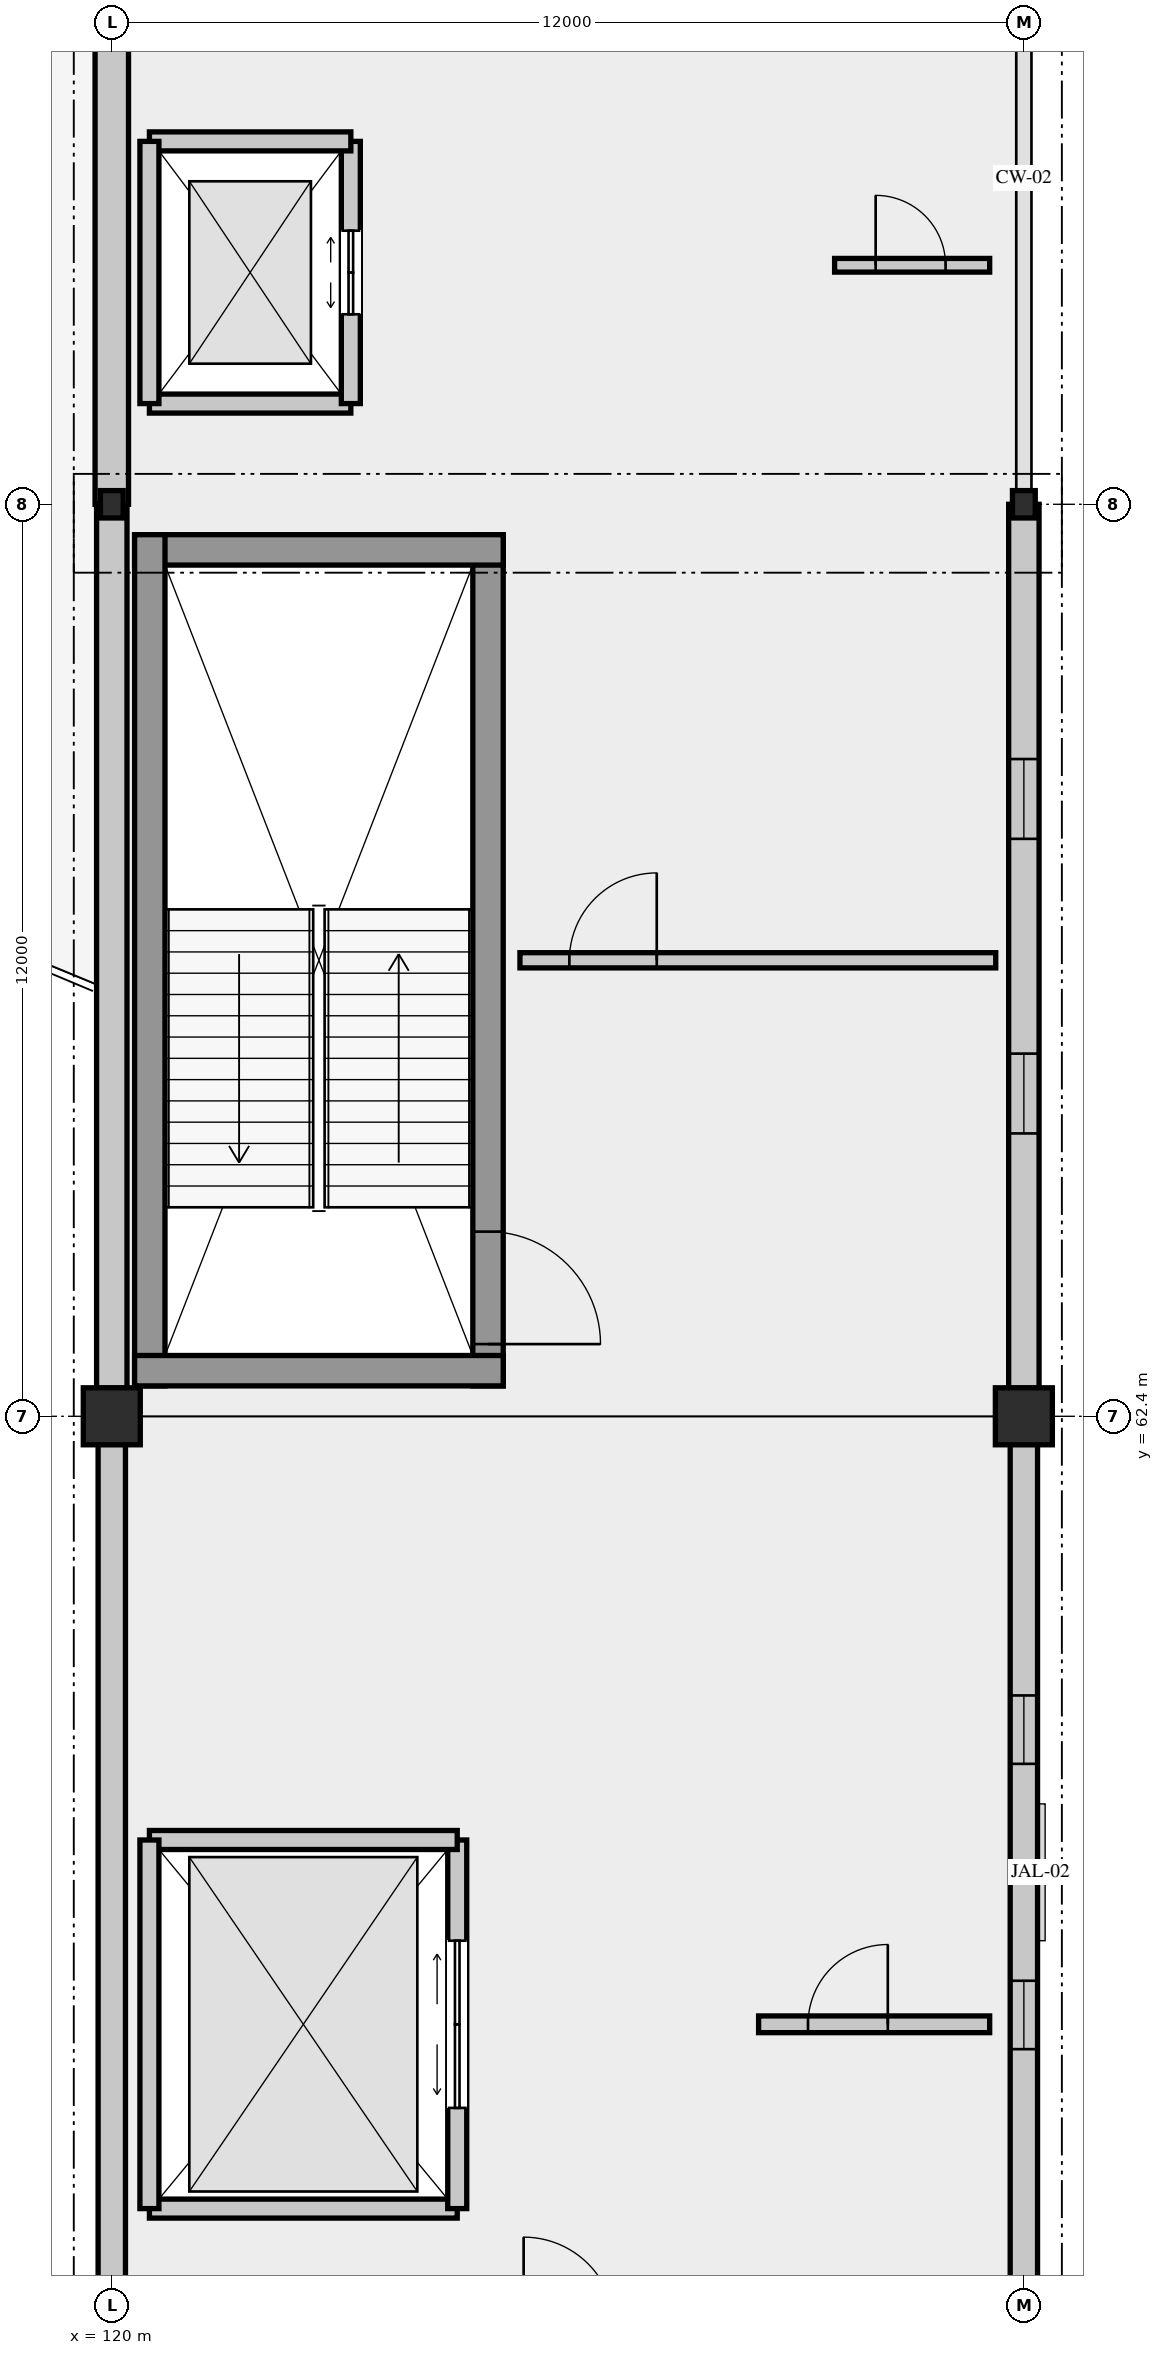
"""IFC4 building model, lengths in metres.
Left out: names, types, materials, properties, quantities, classifications, styles, units other than length and angle.
Written with IfcOpenShell. Run it as: python <this file> out.ifc"""

import sys

from ifc_helpers import new_model, si_unit, direction, frame, frame_2d, origin, origin_2d, place, context, subcontext, project, spatial, rectangle, i_section, extrude, element, fill, save


model = new_model("IFC4")
c1 = context("Model", 3, precision=1e-05, world=origin(), true_north=direction((0.0, 1.0)))
c2 = subcontext(c1, "Body", "Model", "MODEL_VIEW")
j1 = project(units=[si_unit("LENGTHUNIT", "METRE"), si_unit("PLANEANGLEUNIT", "RADIAN")], contexts=[c1])
p1 = place(None, origin())
s1 = spatial("IfcSite", under=j1, at=p1, CompositionType="ELEMENT")
p2 = place(p1, origin())
s2 = spatial("IfcBuilding", under=s1, at=p2, CompositionType="ELEMENT")
p3 = place(p2, origin())
s3 = spatial("IfcBuildingStorey", under=s2, at=p3, CompositionType="ELEMENT", Elevation=0.0)
p4 = place(p3, frame((120.0, 62.4, 0.0), z_axis=(0.0, 0.0, 1.0), x_axis=(1.0, 0.0, 0.0)))
e1 = element("IfcColumn", 1, at=p4, inside=s3, PredefinedType="COLUMN", context=c2, shape_type="SweptSolid", body=[
    extrude(rectangle(XDim=0.75, YDim=0.75, at=origin_2d()), origin(), (0.0, 0.0, 1.0), 5.4),
])
p5 = place(p3, frame((120.0, 74.4, 0.0), z_axis=(0.0, 0.0, 1.0), x_axis=(1.0, 0.0, 0.0)))
e2 = element("IfcColumn", 2, at=p5, inside=s3, PredefinedType="COLUMN", context=c2, shape_type="SweptSolid", body=[
    extrude(i_section(OverallWidth=0.3, OverallDepth=0.36, WebThickness=0.012, FlangeThickness=0.022, FilletRadius=0.027, at=origin_2d()), origin(), (0.0, 0.0, 1.0), 5.4),
])
p6 = place(p3, frame((132.0, 62.4, 0.0), z_axis=(0.0, 0.0, 1.0), x_axis=(1.0, 0.0, 0.0)))
e3 = element("IfcColumn", 3, at=p6, inside=s3, PredefinedType="COLUMN", context=c2, shape_type="SweptSolid", body=[
    extrude(rectangle(XDim=0.75, YDim=0.75, at=origin_2d()), origin(), (0.0, 0.0, 1.0), 5.4),
])
p7 = place(p3, frame((132.0, 74.4, 0.0), z_axis=(0.0, 0.0, 1.0), x_axis=(1.0, 0.0, 0.0)))
e4 = element("IfcColumn", 4, at=p7, inside=s3, PredefinedType="COLUMN", context=c2, shape_type="SweptSolid", body=[
    extrude(i_section(OverallWidth=0.3, OverallDepth=0.36, WebThickness=0.012, FlangeThickness=0.022, FilletRadius=0.027, at=origin_2d()), origin(), (0.0, 0.0, 1.0), 5.4),
])
p8 = place(p3, frame((120.0, 62.03, 0.0), z_axis=(0.0, 0.0, 1.0), x_axis=(0.0, -1.0, 0.0)))
e5 = element("IfcWall", 5, at=p8, inside=s3, PredefinedType="SOLIDWALL", context=c2, shape_type="SweptSolid", body=[
    extrude(rectangle(XDim=11.26, YDim=0.36, at=frame_2d((5.63, 0.0))), origin(), (0.0, 0.0, 1.0), 4.56),
])
p9 = place(p3, frame((132.0, 50.77, 0.0), z_axis=(0.0, 0.0, 1.0), x_axis=(0.0, 1.0, 0.0)))
e6 = element("IfcWall", 6, at=p9, inside=s3, PredefinedType="SOLIDWALL", context=c2, shape_type="SweptSolid", body=[
    extrude(rectangle(XDim=11.26, YDim=0.36, at=frame_2d((5.63, 0.0))), origin(), (0.0, 0.0, 1.0), 4.56),
])
p10 = place(p9, frame((3.303, 0.0, 0.95)))
e7 = element("IfcOpeningElement", 7, at=p10, cuts=e6, PredefinedType="OPENING", context=c2, shape_type="SweptSolid", body=[
    extrude(rectangle(XDim=0.9, YDim=1.8, at=frame_2d((0.45, 0.9))), frame((0.0, 0.19, 0.0), z_axis=(0.0, -1.0, 0.0), x_axis=(1.0, 0.0, 0.0)), (0.0, 0.0, 1.0), 0.38),
])
p11 = place(p9, frame((7.057, 0.0, 0.95)))
e8 = element("IfcOpeningElement", 8, at=p11, cuts=e6, PredefinedType="OPENING", context=c2, shape_type="SweptSolid", body=[
    extrude(rectangle(XDim=0.9, YDim=1.8, at=frame_2d((0.45, 0.9))), frame((0.0, 0.19, 0.0), z_axis=(0.0, -1.0, 0.0), x_axis=(1.0, 0.0, 0.0)), (0.0, 0.0, 1.0), 0.38),
])
p12 = place(p3, frame((120.0, 74.4, 0.0), z_axis=(0.0, 0.0, 1.0), x_axis=(0.0, -1.0, 0.0)))
e9 = element("IfcWall", 9, at=p12, inside=s3, PredefinedType="SOLIDWALL", context=c2, shape_type="SweptSolid", body=[
    extrude(rectangle(XDim=11.63, YDim=0.4, at=frame_2d((5.815, 0.0))), origin(), (0.0, 0.0, 1.0), 4.56),
])
p13 = place(p3, frame((132.0, 62.77, 0.0), z_axis=(0.0, 0.0, 1.0), x_axis=(0.0, 1.0, 0.0)))
e10 = element("IfcWall", 10, at=p13, inside=s3, PredefinedType="SOLIDWALL", context=c2, shape_type="SweptSolid", body=[
    extrude(rectangle(XDim=11.63, YDim=0.4, at=frame_2d((5.815, 0.0))), origin(), (0.0, 0.0, 1.0), 4.56),
])
p14 = place(p13, frame((3.352, 0.0, 0.95)))
e11 = element("IfcOpeningElement", 11, at=p14, cuts=e10, PredefinedType="OPENING", context=c2, shape_type="SweptSolid", body=[
    extrude(rectangle(XDim=1.05, YDim=1.8, at=frame_2d((0.525, 0.9))), frame((0.0, 0.21, 0.0), z_axis=(0.0, -1.0, 0.0), x_axis=(1.0, 0.0, 0.0)), (0.0, 0.0, 1.0), 0.42),
])
p15 = place(p13, frame((7.228, 0.0, 0.95)))
e12 = element("IfcOpeningElement", 12, at=p15, cuts=e10, PredefinedType="OPENING", context=c2, shape_type="SweptSolid", body=[
    extrude(rectangle(XDim=1.05, YDim=1.8, at=frame_2d((0.525, 0.9))), frame((0.0, 0.21, 0.0), z_axis=(0.0, -1.0, 0.0), x_axis=(1.0, 0.0, 0.0)), (0.0, 0.0, 1.0), 0.42),
])
p16 = place(p3, frame((120.0, 84.0, 0.0), z_axis=(0.0, 0.0, 1.0), x_axis=(0.0, -1.0, 0.0)))
e13 = element("IfcWall", 13, at=p16, inside=s3, PredefinedType="SOLIDWALL", context=c2, shape_type="SweptSolid", body=[
    extrude(rectangle(XDim=9.6, YDim=0.44, at=frame_2d((4.8, 0.0))), origin(), (0.0, 0.0, 1.0), 4.52),
])
p17 = place(p3, frame((124.95, 62.8, 0.0), z_axis=(0.0, 0.0, 1.0), x_axis=(0.0, 1.0, 0.0)))
e14 = element("IfcWall", 14, at=p17, inside=s3, PredefinedType="SHEAR", context=c2, shape_type="SweptSolid", body=[
    extrude(rectangle(XDim=11.2, YDim=0.4, at=frame_2d((5.6, 0.0))), origin(), (0.0, 0.0, 1.0), 5.14),
])
p18 = place(p17, frame((0.55, 0.0, 0.0)))
e15 = element("IfcOpeningElement", 15, at=p18, cuts=e14, PredefinedType="OPENING", context=c2, shape_type="SweptSolid", body=[
    extrude(rectangle(XDim=1.48, YDim=2.3, at=frame_2d((0.74, 1.15))), frame((0.0, 0.21, 0.0), z_axis=(0.0, -1.0, 0.0), x_axis=(1.0, 0.0, 0.0)), (0.0, 0.0, 1.0), 0.42),
])
p19 = place(p3, frame((125.15, 73.8, 0.0), z_axis=(0.0, 0.0, 1.0), x_axis=(-1.0, 0.0, 0.0)))
e16 = element("IfcWall", 16, at=p19, inside=s3, PredefinedType="SHEAR", context=c2, shape_type="SweptSolid", body=[
    extrude(rectangle(XDim=4.85, YDim=0.4, at=frame_2d((2.425, 0.0))), origin(), (0.0, 0.0, 1.0), 5.14),
])
p20 = place(p3, frame((120.5, 74.0, 0.0), z_axis=(0.0, 0.0, 1.0), x_axis=(0.0, -1.0, 0.0)))
e17 = element("IfcWall", 17, at=p20, inside=s3, PredefinedType="SHEAR", context=c2, shape_type="SweptSolid", body=[
    extrude(rectangle(XDim=11.2, YDim=0.4, at=frame_2d((5.6, 0.0))), origin(), (0.0, 0.0, 1.0), 5.14),
])
p21 = place(p3, frame((120.3, 63.0, 0.0), z_axis=(0.0, 0.0, 1.0), x_axis=(1.0, 0.0, 0.0)))
e18 = element("IfcWall", 18, at=p21, inside=s3, PredefinedType="SHEAR", context=c2, shape_type="SweptSolid", body=[
    extrude(rectangle(XDim=4.85, YDim=0.4, at=frame_2d((2.425, 0.0))), origin(), (0.0, 0.0, 1.0), 5.14),
])
p22 = place(p3, frame((120.495, 75.725, 0.0), z_axis=(0.0, 0.0, 1.0), x_axis=(1.0, 0.0, 0.0)))
e19 = element("IfcWall", 19, at=p22, inside=s3, PredefinedType="SOLIDWALL", context=c2, shape_type="SweptSolid", body=[
    extrude(rectangle(XDim=2.65, YDim=0.25, at=frame_2d((1.325, 0.0))), origin(), (0.0, 0.0, 1.0), 5.14),
])
p23 = place(p3, frame((123.145, 75.725, 0.0), z_axis=(0.0, 0.0, 1.0), x_axis=(0.0, 1.0, 0.0)))
e20 = element("IfcWall", 20, at=p23, inside=s3, PredefinedType="SOLIDWALL", context=c2, shape_type="SweptSolid", body=[
    extrude(rectangle(XDim=3.45, YDim=0.25, at=frame_2d((1.725, 0.0))), origin(), (0.0, 0.0, 1.0), 5.14),
])
p24 = place(p23, frame((1.175, 0.0, 0.0)))
e21 = element("IfcOpeningElement", 21, at=p24, cuts=e20, PredefinedType="OPENING", context=c2, shape_type="SweptSolid", body=[
    extrude(rectangle(XDim=1.1, YDim=2.2, at=frame_2d((0.55, 1.1))), frame((0.0, 0.135, 0.0), z_axis=(0.0, -1.0, 0.0), x_axis=(1.0, 0.0, 0.0)), (0.0, 0.0, 1.0), 0.27),
])
p25 = place(p3, frame((123.145, 79.175, 0.0), z_axis=(0.0, 0.0, 1.0), x_axis=(-1.0, 0.0, 0.0)))
e22 = element("IfcWall", 22, at=p25, inside=s3, PredefinedType="SOLIDWALL", context=c2, shape_type="SweptSolid", body=[
    extrude(rectangle(XDim=2.65, YDim=0.25, at=frame_2d((1.325, 0.0))), origin(), (0.0, 0.0, 1.0), 5.14),
])
p26 = place(p3, frame((120.495, 79.175, 0.0), z_axis=(0.0, 0.0, 1.0), x_axis=(0.0, -1.0, 0.0)))
e23 = element("IfcWall", 23, at=p26, inside=s3, PredefinedType="SOLIDWALL", context=c2, shape_type="SweptSolid", body=[
    extrude(rectangle(XDim=3.45, YDim=0.25, at=frame_2d((1.725, 0.0))), origin(), (0.0, 0.0, 1.0), 5.14),
])
p27 = place(p3, frame((120.495, 51.975, 0.0), z_axis=(0.0, 0.0, 1.0), x_axis=(1.0, 0.0, 0.0)))
e24 = element("IfcWall", 24, at=p27, inside=s3, PredefinedType="SOLIDWALL", context=c2, shape_type="SweptSolid", body=[
    extrude(rectangle(XDim=4.05, YDim=0.25, at=frame_2d((2.025, 0.0))), origin(), (0.0, 0.0, 1.0), 5.14),
])
p28 = place(p3, frame((124.545, 51.975, 0.0), z_axis=(0.0, 0.0, 1.0), x_axis=(0.0, 1.0, 0.0)))
e25 = element("IfcWall", 25, at=p28, inside=s3, PredefinedType="SOLIDWALL", context=c2, shape_type="SweptSolid", body=[
    extrude(rectangle(XDim=4.85, YDim=0.25, at=frame_2d((2.425, 0.0))), origin(), (0.0, 0.0, 1.0), 5.14),
])
p29 = place(p28, frame((1.325, 0.0, 0.0)))
e26 = element("IfcOpeningElement", 26, at=p29, cuts=e25, PredefinedType="OPENING", context=c2, shape_type="SweptSolid", body=[
    extrude(rectangle(XDim=2.2, YDim=2.65, at=frame_2d((1.1, 1.325))), frame((0.0, 0.135, 0.0), z_axis=(0.0, -1.0, 0.0), x_axis=(1.0, 0.0, 0.0)), (0.0, 0.0, 1.0), 0.27),
])
p30 = place(p3, frame((124.545, 56.825, 0.0), z_axis=(0.0, 0.0, 1.0), x_axis=(-1.0, 0.0, 0.0)))
e27 = element("IfcWall", 27, at=p30, inside=s3, PredefinedType="SOLIDWALL", context=c2, shape_type="SweptSolid", body=[
    extrude(rectangle(XDim=4.05, YDim=0.25, at=frame_2d((2.025, 0.0))), origin(), (0.0, 0.0, 1.0), 5.14),
])
p31 = place(p3, frame((120.495, 56.825, 0.0), z_axis=(0.0, 0.0, 1.0), x_axis=(0.0, -1.0, 0.0)))
e28 = element("IfcWall", 28, at=p31, inside=s3, PredefinedType="SOLIDWALL", context=c2, shape_type="SweptSolid", body=[
    extrude(rectangle(XDim=4.85, YDim=0.25, at=frame_2d((2.425, 0.0))), origin(), (0.0, 0.0, 1.0), 5.14),
])
p32 = place(p3, frame((128.51, 54.4, 0.0), z_axis=(0.0, 0.0, 1.0), x_axis=(1.0, 0.0, 0.0)))
e29 = element("IfcWall", 29, at=p32, inside=s3, PredefinedType="PARTITIONING", context=c2, shape_type="SweptSolid", body=[
    extrude(rectangle(XDim=3.04, YDim=0.22, at=frame_2d((1.52, 0.0))), origin(), (0.0, 0.0, 1.0), 4.67),
])
p33 = place(p32, frame((0.65, 0.0, 0.0)))
e30 = element("IfcOpeningElement", 30, at=p33, cuts=e29, PredefinedType="OPENING", context=c2, shape_type="SweptSolid", body=[
    extrude(rectangle(XDim=1.05, YDim=2.2, at=frame_2d((0.525, 1.1))), frame((0.0, 0.12, 0.0), z_axis=(0.0, -1.0, 0.0), x_axis=(1.0, 0.0, 0.0)), (0.0, 0.0, 1.0), 0.24),
])
p34 = place(p3, frame((125.37, 68.4, 0.0), z_axis=(0.0, 0.0, 1.0), x_axis=(1.0, 0.0, 0.0)))
e31 = element("IfcWall", 31, at=p34, inside=s3, PredefinedType="PARTITIONING", context=c2, shape_type="SweptSolid", body=[
    extrude(rectangle(XDim=6.26, YDim=0.2, at=frame_2d((3.13, 0.0))), origin(), (0.0, 0.0, 1.0), 4.67),
])
p35 = place(p34, frame((0.65, 0.0, 0.0)))
e32 = element("IfcOpeningElement", 32, at=p35, cuts=e31, PredefinedType="OPENING", context=c2, shape_type="SweptSolid", body=[
    extrude(rectangle(XDim=1.15, YDim=2.25, at=frame_2d((0.575, 1.125))), frame((0.0, 0.11, 0.0), z_axis=(0.0, -1.0, 0.0), x_axis=(1.0, 0.0, 0.0)), (0.0, 0.0, 1.0), 0.22),
])
p36 = place(p3, frame((129.51, 77.545, 0.0), z_axis=(0.0, 0.0, 1.0), x_axis=(1.0, 0.0, 0.0)))
e33 = element("IfcWall", 33, at=p36, inside=s3, PredefinedType="PARTITIONING", context=c2, shape_type="SweptSolid", body=[
    extrude(rectangle(XDim=2.04, YDim=0.18, at=frame_2d((1.02, 0.0))), origin(), (0.0, 0.0, 1.0), 4.76),
])
p37 = place(p36, frame((0.54, 0.0, 0.0)))
e34 = element("IfcOpeningElement", 34, at=p37, cuts=e33, PredefinedType="OPENING", context=c2, shape_type="SweptSolid", body=[
    extrude(rectangle(XDim=0.92, YDim=2.15, at=frame_2d((0.46, 1.075))), frame((0.0, 0.1, 0.0), z_axis=(0.0, -1.0, 0.0), x_axis=(1.0, 0.0, 0.0)), (0.0, 0.0, 1.0), 0.2),
])
p38 = place(p10, origin())
e35 = element("IfcWindow", 35, at=p38, inside=s3, PartitioningType="SINGLE_PANEL", PredefinedType="WINDOW", context=c2, shape_type="SweptSolid", body=[
    extrude(rectangle(XDim=0.9, YDim=1.8, at=frame_2d((0.45, 0.9))), frame((0.0, 0.03, 0.0), z_axis=(0.0, -1.0, 0.0), x_axis=(1.0, 0.0, 0.0)), (0.0, 0.0, 1.0), 0.06),
])
fill(e7, e35)
p39 = place(p11, origin())
e36 = element("IfcWindow", 36, at=p39, inside=s3, PartitioningType="SINGLE_PANEL", PredefinedType="WINDOW", context=c2, shape_type="SweptSolid", body=[
    extrude(rectangle(XDim=0.9, YDim=1.8, at=frame_2d((0.45, 0.9))), frame((0.0, 0.03, 0.0), z_axis=(0.0, -1.0, 0.0), x_axis=(1.0, 0.0, 0.0)), (0.0, 0.0, 1.0), 0.06),
])
fill(e8, e36)
p40 = place(p14, origin())
e37 = element("IfcWindow", 37, at=p40, inside=s3, PartitioningType="SINGLE_PANEL", PredefinedType="WINDOW", context=c2, shape_type="SweptSolid", body=[
    extrude(rectangle(XDim=1.05, YDim=1.8, at=frame_2d((0.525, 0.9))), frame((0.0, 0.03, 0.0), z_axis=(0.0, -1.0, 0.0), x_axis=(1.0, 0.0, 0.0)), (0.0, 0.0, 1.0), 0.06),
])
fill(e11, e37)
p41 = place(p15, origin())
e38 = element("IfcWindow", 38, at=p41, inside=s3, PartitioningType="SINGLE_PANEL", PredefinedType="WINDOW", context=c2, shape_type="SweptSolid", body=[
    extrude(rectangle(XDim=1.05, YDim=1.8, at=frame_2d((0.525, 0.9))), frame((0.0, 0.03, 0.0), z_axis=(0.0, -1.0, 0.0), x_axis=(1.0, 0.0, 0.0)), (0.0, 0.0, 1.0), 0.06),
])
fill(e12, e38)
p42 = place(p18, frame((1.48, 0.0, 0.0), z_axis=(0.0, 0.0, 1.0), x_axis=(-1.0, 0.0, 0.0)))
e39 = element("IfcDoor", 39, at=p42, inside=s3, OperationType="DOUBLE_DOOR_SINGLE_SWING", PredefinedType="DOOR", context=c2, shape_type="SweptSolid", body=[
    extrude(rectangle(XDim=1.48, YDim=2.3, at=frame_2d((0.74, 1.15))), frame((0.0, 0.025, 0.0), z_axis=(0.0, -1.0, 0.0), x_axis=(1.0, 0.0, 0.0)), (0.0, 0.0, 1.0), 0.05),
])
fill(e15, e39)
p43 = place(p24, origin())
e40 = element("IfcDoor", 40, at=p43, inside=s3, OperationType="SLIDING_TO_LEFT", PredefinedType="DOOR", context=c2, shape_type="SweptSolid", body=[
    extrude(rectangle(XDim=1.1, YDim=2.2, at=frame_2d((0.55, 1.1))), frame((0.0, 0.025, 0.0), z_axis=(0.0, -1.0, 0.0), x_axis=(1.0, 0.0, 0.0)), (0.0, 0.0, 1.0), 0.05),
])
fill(e21, e40)
p44 = place(p29, origin())
e41 = element("IfcDoor", 41, at=p44, inside=s3, OperationType="DOUBLE_DOOR_SLIDING", PredefinedType="DOOR", context=c2, shape_type="SweptSolid", body=[
    extrude(rectangle(XDim=2.2, YDim=2.65, at=frame_2d((1.1, 1.325))), frame((0.0, 0.025, 0.0), z_axis=(0.0, -1.0, 0.0), x_axis=(1.0, 0.0, 0.0)), (0.0, 0.0, 1.0), 0.05),
])
fill(e26, e41)
p45 = place(p33, origin())
e42 = element("IfcDoor", 42, at=p45, inside=s3, OperationType="SINGLE_SWING_RIGHT", PredefinedType="DOOR", context=c2, shape_type="SweptSolid", body=[
    extrude(rectangle(XDim=1.05, YDim=2.2, at=frame_2d((0.525, 1.1))), frame((0.0, 0.025, 0.0), z_axis=(0.0, -1.0, 0.0), x_axis=(1.0, 0.0, 0.0)), (0.0, 0.0, 1.0), 0.05),
])
fill(e30, e42)
p46 = place(p35, origin())
e43 = element("IfcDoor", 43, at=p46, inside=s3, OperationType="SINGLE_SWING_RIGHT", PredefinedType="DOOR", context=c2, shape_type="SweptSolid", body=[
    extrude(rectangle(XDim=1.15, YDim=2.25, at=frame_2d((0.575, 1.125))), frame((0.0, 0.025, 0.0), z_axis=(0.0, -1.0, 0.0), x_axis=(1.0, 0.0, 0.0)), (0.0, 0.0, 1.0), 0.05),
])
fill(e32, e43)
p47 = place(p37, origin())
e44 = element("IfcDoor", 44, at=p47, inside=s3, OperationType="SINGLE_SWING_LEFT", PredefinedType="DOOR", context=c2, shape_type="SweptSolid", body=[
    extrude(rectangle(XDim=0.92, YDim=2.15, at=frame_2d((0.46, 1.075))), frame((0.0, 0.025, 0.0), z_axis=(0.0, -1.0, 0.0), x_axis=(1.0, 0.0, 0.0)), (0.0, 0.0, 1.0), 0.05),
])
fill(e34, e44)
save(model, sys.argv[1])
